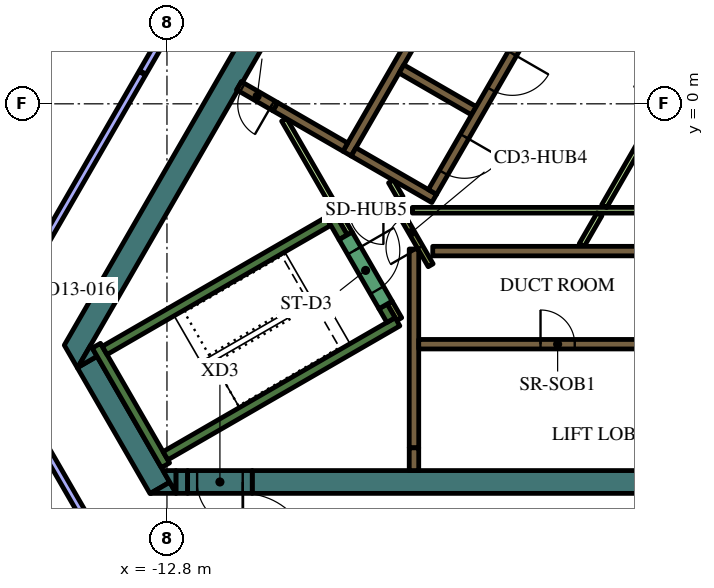
"""IFC4 building model, lengths in metres.
Left out: names, types, materials, properties, quantities, classifications, styles, units other than length and angle.
Written with IfcOpenShell. Run it as: python <this file> out.ifc"""

import sys

from ifc_helpers import new_model, si_unit, direction, frame, frame_2d, origin, place, context, subcontext, project, spatial, polyline, rectangle, outline, extrude, element, fill, save


model = new_model("IFC4")
c1 = context("Model", 3, precision=1e-05, world=origin(), true_north=direction((0.0, 1.0)))
c2 = subcontext(c1, "Body", "Model", "MODEL_VIEW")
j1 = project(units=[si_unit("LENGTHUNIT", "METRE"), si_unit("PLANEANGLEUNIT", "RADIAN")], contexts=[c1])
p1 = place(None, origin())
s1 = spatial("IfcSite", under=j1, at=p1, CompositionType="ELEMENT")
p2 = place(p1, origin())
s2 = spatial("IfcBuilding", under=s1, at=p2, CompositionType="ELEMENT")
p3 = place(p2, frame((0.0, 0.0, 292.2)))
s3 = spatial("IfcBuildingStorey", under=s2, at=p3, CompositionType="ELEMENT", Elevation=292.2)
p4 = place(p3, origin())
e1 = element("IfcWall", 1, at=p4, inside=s3, PredefinedType="SOLIDWALL", context=c2, shape_type="SweptSolid", body=[
    extrude(outline(polyline([(-15.502, -6.35), (-4.912, 11.992), (-4.393, 11.692), (-10.815, 0.569), (-10.84, 0.583), (-10.84, 0.583), (-10.84, 0.583), (-10.965, 0.367), (-10.965, 0.367), (-10.965, 0.367), (-10.94, 0.352), (-11.033, 0.191), (-14.809, -6.35), (-15.156, -6.95), (-15.502, -6.35)])), origin(), (0.0, 0.0, 1.0), 4.2),
])
p5 = place(p3, frame((-14.899, -6.795, 0.0), z_axis=(0.0, 0.0, 1.0), x_axis=(0.499950938802, -0.866053727428, 0.0)))
e2 = element("IfcWall", 2, at=p5, inside=s3, PredefinedType="SOLIDWALL", context=c2, shape_type="SweptSolid", body=[
    extrude(rectangle(XDim=3.823, YDim=0.6, at=frame_2d((1.912, 0.0))), origin(), (0.0, 0.0, 1.0), 4.2),
])
e3 = element("IfcWall", 3, at=p4, inside=s3, PredefinedType="SOLIDWALL", context=c2, shape_type="SweptSolid", body=[
    extrude(outline(polyline([(-14.64, -6.643), (-15.147, -6.936), (-14.809, -6.35), (-14.64, -6.643)])), origin(), (0.0, 0.0, 1.0), 4.2),
])
e4 = element("IfcWall", 4, at=p4, inside=s3, PredefinedType="SOLIDWALL", context=c2, shape_type="SweptSolid", body=[
    extrude(outline(polyline([(-12.557, -10.25), (-13.233, -10.25), (-12.726, -9.957), (-12.557, -10.25)])), origin(), (0.0, 0.0, 1.0), 4.2),
])
p6 = place(p3, frame((-12.257, -9.95, 0.0), z_axis=(0.0, 0.0, 1.0), x_axis=(-1.0, 0.0, 0.0)))
e5 = element("IfcWall", 5, at=p6, inside=s3, PredefinedType="SOLIDWALL", context=c2, shape_type="SweptSolid", body=[
    extrude(rectangle(XDim=0.307, YDim=0.6, at=frame_2d((0.154, 0.0))), origin(), (0.0, 0.0, 1.0), 4.2),
])
e6 = element("IfcWall", 6, at=p4, inside=s3, PredefinedType="SOLIDWALL", context=c2, shape_type="SweptSolid", body=[
    extrude(outline(polyline([(-12.904, -9.65), (-12.566, -9.65), (-12.566, -10.236), (-12.904, -9.65)])), origin(), (0.0, 0.0, 1.0), 4.2),
])
p7 = place(p3, frame((-10.556, -9.95, 0.0), z_axis=(0.0, 0.0, 1.0), x_axis=(1.0, 0.0, 0.0)))
e7 = element("IfcWall", 7, at=p7, inside=s3, PredefinedType="SOLIDWALL", context=c2, shape_type="SweptSolid", body=[
    extrude(rectangle(XDim=19.461, YDim=0.6, at=frame_2d((9.73, 0.0))), origin(), (0.0, 0.0, 1.0), 4.2),
])
p8 = place(p3, frame((-12.84, -9.511, 0.0), z_axis=(0.0, 0.0, 1.0), x_axis=(-0.499997733992, 0.866026712061, 0.0)))
e8 = element("IfcWall", 8, at=p8, inside=s3, PredefinedType="SOLIDWALL", context=c2, shape_type="SweptSolid", body=[
    extrude(rectangle(XDim=3.634, YDim=0.25, at=frame_2d((1.817, 0.0))), origin(), (0.0, 0.0, 1.0), 4.2),
])
p9 = place(p3, frame((-14.44, -6.49, 0.0), z_axis=(0.0, 0.0, 1.0), x_axis=(0.866022966069, 0.500004222222, 0.0)))
e9 = element("IfcWall", 9, at=p9, inside=s3, PredefinedType="SOLIDWALL", context=c2, shape_type="SweptSolid", body=[
    extrude(rectangle(XDim=6.8, YDim=0.25, at=frame_2d((3.4, 0.0))), origin(), (0.0, 0.0, 1.0), 4.2),
])
p10 = place(p3, frame((-8.163, -3.511, 0.0), z_axis=(0.0, 0.0, 1.0), x_axis=(-0.499994068514, 0.866028828302, 0.0)))
e10 = element("IfcWall", 10, at=p10, inside=s3, PredefinedType="SOLIDWALL", context=c2, shape_type="SweptSolid", body=[
    extrude(rectangle(XDim=0.674, YDim=0.25, at=frame_2d((0.337, 0.0))), origin(), (0.0, 0.0, 1.0), 4.2),
])
p11 = place(p3, frame((-12.84, -9.261, 0.0), z_axis=(0.0, 0.0, 1.0), x_axis=(0.866016039709, 0.500016218704, 0.0)))
e11 = element("IfcWall", 11, at=p11, inside=s3, PredefinedType="SOLIDWALL", context=c2, shape_type="SweptSolid", body=[
    extrude(rectangle(XDim=7.05, YDim=0.25, at=frame_2d((3.525, 0.0))), origin(), (0.0, 0.0, 1.0), 4.2),
])
p12 = place(p3, frame((-6.905, -5.69, 0.0), z_axis=(0.0, 0.0, 1.0), x_axis=(-0.499993700073, 0.866029041019, 0.0)))
e12 = element("IfcWall", 12, at=p12, inside=s3, PredefinedType="SOLIDWALL", context=c2, shape_type="SweptSolid", body=[
    extrude(rectangle(XDim=0.416, YDim=0.25, at=frame_2d((0.208, 0.0))), origin(), (0.0, 0.0, 1.0), 4.2),
])
p13 = place(p3, frame((-5.806, -3.875, 0.0), z_axis=(0.0, 0.0, 1.0), x_axis=(1.0, 0.0, 0.0)))
e13 = element("IfcWall", 13, at=p13, inside=s3, PredefinedType="SOLIDWALL", context=c2, shape_type="SweptSolid", body=[
    extrude(rectangle(XDim=12.231, YDim=0.25, at=frame_2d((6.116, 0.0))), origin(), (0.0, 0.0, 1.0), 4.2),
])
p14 = place(p3, frame((-6.3, -9.05, 0.0), z_axis=(0.0, 0.0, 1.0), x_axis=(0.0, 1.0, 0.0)))
e14 = element("IfcWall", 14, at=p14, inside=s3, PredefinedType="SOLIDWALL", context=c2, shape_type="SweptSolid", body=[
    extrude(rectangle(XDim=5.23, YDim=0.25, at=frame_2d((2.615, 0.0))), origin(), (0.0, 0.0, 1.0), 4.2),
])
p15 = place(p3, frame((-6.3, -9.052, 0.0), z_axis=(0.0, 0.0, 1.0), x_axis=(0.0, -1.0, 0.0)))
e15 = element("IfcWall", 15, at=p15, inside=s3, PredefinedType="SOLIDWALL", context=c2, shape_type="SweptSolid", body=[
    extrude(rectangle(XDim=0.598, YDim=0.25, at=frame_2d((0.299, 0.0))), origin(), (0.0, 0.0, 1.0), 4.2),
])
p16 = place(p3, frame((-8.06, -1.311, 0.0), z_axis=(0.0, 0.0, 1.0), x_axis=(0.50000273126, 0.866023826885, 0.0)))
e16 = element("IfcWall", 16, at=p16, inside=s3, PredefinedType="SOLIDWALL", context=c2, shape_type="SweptSolid", body=[
    extrude(rectangle(XDim=10.33, YDim=0.25, at=frame_2d((5.165, 0.0))), origin(), (0.0, 0.0, 1.0), 4.2),
])
p17 = place(p3, frame((-4.724, -0.182, 0.0), z_axis=(0.0, 0.0, 1.0), x_axis=(-0.866008176907, 0.50002983664, 0.0)))
e17 = element("IfcWall", 17, at=p17, inside=s3, PredefinedType="SOLIDWALL", context=c2, shape_type="SweptSolid", body=[
    extrude(rectangle(XDim=2.2, YDim=0.25, at=frame_2d((1.1, 0.0))), origin(), (0.0, 0.0, 1.0), 4.2),
])
p18 = place(p3, frame((-7.889, -1.265, 0.0), z_axis=(0.0, 0.0, 1.0), x_axis=(0.866057815567, -0.499943856944, 0.0)))
e18 = element("IfcWall", 18, at=p18, inside=s3, PredefinedType="SOLIDWALL", context=c2, shape_type="SweptSolid", body=[
    extrude(rectangle(XDim=2.45, YDim=0.25, at=frame_2d((1.225, 0.0))), origin(), (0.0, 0.0, 1.0), 4.2),
])
p19 = place(p3, frame((-9.95, -0.075, 0.0), z_axis=(0.0, 0.0, 1.0), x_axis=(0.865962177421, -0.500109495288, 0.0)))
e19 = element("IfcWall", 19, at=p19, inside=s3, PredefinedType="SOLIDWALL", context=c2, shape_type="SweptSolid", body=[
    extrude(rectangle(XDim=2.129, YDim=0.25, at=frame_2d((1.065, 0.0))), origin(), (0.0, 0.0, 1.0), 4.2),
])
p20 = place(p3, frame((-9.718, -0.417, 0.0), z_axis=(0.0, 0.0, 1.0), x_axis=(0.499966538646, -0.866044721844, 0.0)))
e20 = element("IfcWall", 20, at=p20, inside=s3, PredefinedType="PARTITIONING", context=c2, shape_type="SweptSolid", body=[
    extrude(rectangle(XDim=2.511, YDim=0.15, at=frame_2d((1.255, 0.0))), origin(), (0.0, 0.0, 1.0), 3.55),
])
p21 = place(p3, frame((1.438, -2.8, 0.0), z_axis=(0.0, 0.0, 1.0), x_axis=(-1.0, 0.0, 0.0)))
e21 = element("IfcWall", 21, at=p21, inside=s3, PredefinedType="PARTITIONING", context=c2, shape_type="SweptSolid", body=[
    extrude(rectangle(XDim=7.781, YDim=0.15, at=frame_2d((3.891, 0.0))), origin(), (0.0, 0.0, 1.0), 3.55),
])
p22 = place(p3, frame((-1.418, -2.907, 0.0), z_axis=(0.0, 0.0, 1.0), x_axis=(-0.499978056798, -0.866038072327, 0.0)))
e22 = element("IfcWall", 22, at=p22, inside=s3, PredefinedType="PARTITIONING", context=c2, shape_type="SweptSolid", body=[
    extrude(rectangle(XDim=0.937, YDim=0.15, at=frame_2d((0.469, 0.0))), origin(), (0.0, 0.0, 1.0), 3.55),
])
p23 = place(p3, frame((-1.295, -2.693, 0.0), z_axis=(0.0, 0.0, 1.0), x_axis=(0.500030943131, 0.866007538022, 0.0)))
e23 = element("IfcWall", 23, at=p23, inside=s3, PredefinedType="PARTITIONING", context=c2, shape_type="SweptSolid", body=[
    extrude(rectangle(XDim=2.672, YDim=0.15, at=frame_2d((1.336, 0.0))), origin(), (0.0, 0.0, 1.0), 3.55),
])
p24 = place(p3, frame((-6.653, -2.477, 0.0), z_axis=(0.0, 0.0, 1.0), x_axis=(-0.500002592159, 0.866023907196, 0.0)))
e24 = element("IfcWall", 24, at=p24, inside=s3, PredefinedType="PARTITIONING", context=c2, shape_type="SweptSolid", body=[
    extrude(rectangle(XDim=0.503, YDim=0.15, at=frame_2d((0.251, 0.0))), origin(), (0.0, 0.0, 1.0), 3.55),
])
p25 = place(p3, frame((-7.99, -3.412, 0.0), z_axis=(0.0, 0.0, 1.0), x_axis=(-0.499858525911, 0.866107068482, 0.0)))
e25 = element("IfcWall", 25, at=p25, inside=s3, PredefinedType="PARTITIONING", context=c2, shape_type="SweptSolid", body=[
    extrude(rectangle(XDim=0.466, YDim=0.15, at=frame_2d((0.233, 0.0))), origin(), (0.0, 0.0, 1.0), 3.55),
])
p26 = place(p3, frame((-6.94, -5.23, 0.0), z_axis=(0.0, 0.0, 1.0), x_axis=(0.499834152157, -0.86612113491, 0.0)))
e26 = element("IfcWall", 26, at=p26, inside=s3, PredefinedType="PARTITIONING", context=c2, shape_type="SweptSolid", body=[
    extrude(rectangle(XDim=0.505, YDim=0.15, at=frame_2d((0.252, 0.0))), origin(), (0.0, 0.0, 1.0), 4.2),
])
p27 = place(p3, frame((-6.175, -6.325, 0.0), z_axis=(0.0, 0.0, 1.0), x_axis=(1.0, 0.0, 0.0)))
e27 = element("IfcWall", 27, at=p27, inside=s3, PredefinedType="SOLIDWALL", context=c2, shape_type="SweptSolid", body=[
    extrude(rectangle(XDim=12.35, YDim=0.25, at=frame_2d((6.175, 0.0))), origin(), (0.0, 0.0, 1.0), 4.2),
])
p28 = place(p27, frame((3.205, 0.0, 0.0)))
e28 = element("IfcOpeningElement", 28, at=p28, cuts=e27, PredefinedType="OPENING", context=c2, shape_type="SweptSolid", body=[
    extrude(rectangle(XDim=0.9, YDim=2.1, at=frame_2d((0.45, 1.05))), frame((0.0, 0.135, 0.0), z_axis=(0.0, -1.0, 0.0), x_axis=(1.0, 0.0, 0.0)), (0.0, 0.0, 1.0), 0.27),
])
p29 = place(p27, frame((8.145, 0.0, 0.0)))
e29 = element("IfcOpeningElement", 29, at=p29, cuts=e27, PredefinedType="OPENING", context=c2, shape_type="SweptSolid", body=[
    extrude(rectangle(XDim=1.1, YDim=2.1, at=frame_2d((0.55, 1.05))), frame((0.0, 0.135, 0.0), z_axis=(0.0, -1.0, 0.0), x_axis=(1.0, 0.0, 0.0)), (0.0, 0.0, 1.0), 0.27),
])
p30 = place(p27, frame((10.665, 0.0, 0.0)))
e30 = element("IfcOpeningElement", 30, at=p30, cuts=e27, PredefinedType="OPENING", context=c2, shape_type="SweptSolid", body=[
    extrude(rectangle(XDim=1.1, YDim=2.1, at=frame_2d((0.55, 1.05))), frame((0.0, 0.135, 0.0), z_axis=(0.0, -1.0, 0.0), x_axis=(1.0, 0.0, 0.0)), (0.0, 0.0, 1.0), 0.27),
])
p31 = place(p3, frame((-0.898, 6.194, 0.0), z_axis=(0.0, 0.0, 1.0), x_axis=(-0.499996202215, -0.866027596426, 0.0)))
e31 = element("IfcWall", 31, at=p31, inside=s3, PredefinedType="SOLIDWALL", context=c2, shape_type="SweptSolid", body=[
    extrude(rectangle(XDim=9.83, YDim=0.25, at=frame_2d((4.915, 0.0))), origin(), (0.0, 0.0, 1.0), 4.2),
])
p32 = place(p31, frame((0.585, 0.0, 0.0)))
e32 = element("IfcOpeningElement", 32, at=p32, cuts=e31, PredefinedType="OPENING", context=c2, shape_type="SweptSolid", body=[
    extrude(rectangle(XDim=1.1, YDim=2.1, at=frame_2d((0.55, 1.05))), frame((0.0, 0.135, 0.0), z_axis=(0.0, -1.0, 0.0), x_axis=(1.0, 0.0, 0.0)), (0.0, 0.0, 1.0), 0.27),
])
p33 = place(p31, frame((3.105, 0.0, 0.0)))
e33 = element("IfcOpeningElement", 33, at=p33, cuts=e31, PredefinedType="OPENING", context=c2, shape_type="SweptSolid", body=[
    extrude(rectangle(XDim=1.1, YDim=2.1, at=frame_2d((0.55, 1.05))), frame((0.0, 0.135, 0.0), z_axis=(0.0, -1.0, 0.0), x_axis=(1.0, 0.0, 0.0)), (0.0, 0.0, 1.0), 0.27),
])
p34 = place(p31, frame((5.625, 0.0, 0.0)))
e34 = element("IfcOpeningElement", 34, at=p34, cuts=e31, PredefinedType="OPENING", context=c2, shape_type="SweptSolid", body=[
    extrude(rectangle(XDim=1.1, YDim=2.1, at=frame_2d((0.55, 1.05))), frame((0.0, 0.135, 0.0), z_axis=(0.0, -1.0, 0.0), x_axis=(1.0, 0.0, 0.0)), (0.0, 0.0, 1.0), 0.27),
])
p35 = place(p31, frame((8.145, 0.0, 0.0)))
e35 = element("IfcOpeningElement", 35, at=p35, cuts=e31, PredefinedType="OPENING", context=c2, shape_type="SweptSolid", body=[
    extrude(rectangle(XDim=1.1, YDim=2.1, at=frame_2d((0.55, 1.05))), frame((0.0, 0.135, 0.0), z_axis=(0.0, -1.0, 0.0), x_axis=(1.0, 0.0, 0.0)), (0.0, 0.0, 1.0), 0.27),
])
p36 = place(p3, frame((-8.098, -3.474, 0.0), z_axis=(0.0, 0.0, 1.0), x_axis=(0.49994051562, -0.866059744384, 0.0)))
e36 = element("IfcWall", 36, at=p36, inside=s3, PredefinedType="SOLIDWALL", context=c2, shape_type="SweptSolid", body=[
    extrude(rectangle(XDim=2.1, YDim=0.4, at=frame_2d((1.05, 0.0))), origin(), (0.0, 0.0, 1.0), 4.2),
])
p37 = place(p36, frame((0.45, 0.0, 0.0)))
e37 = element("IfcOpeningElement", 37, at=p37, cuts=e36, PredefinedType="OPENING", context=c2, shape_type="SweptSolid", body=[
    extrude(rectangle(XDim=1.2, YDim=2.1, at=frame_2d((0.6, 1.05))), frame((0.0, 0.21, 0.0), z_axis=(0.0, -1.0, 0.0), x_axis=(1.0, 0.0, 0.0)), (0.0, 0.0, 1.0), 0.42),
])
p38 = place(p3, frame((-5.861, -4.248, 0.0), z_axis=(0.0, 0.0, 1.0), x_axis=(-0.500043646338, 0.866000203093, 0.0)))
e38 = element("IfcWall", 38, at=p38, inside=s3, PredefinedType="PARTITIONING", context=c2, shape_type="SweptSolid", body=[
    extrude(rectangle(XDim=1.93, YDim=0.15, at=frame_2d((0.965, 0.0))), origin(), (0.0, 0.0, 1.0), 4.2),
])
p39 = place(p38, frame((0.55, 0.0, 0.0)))
e39 = element("IfcOpeningElement", 39, at=p39, cuts=e38, PredefinedType="OPENING", context=c2, shape_type="SweptSolid", body=[
    extrude(rectangle(XDim=0.9, YDim=2.1, at=frame_2d((0.45, 1.05))), frame((0.0, 0.085, 0.0), z_axis=(0.0, -1.0, 0.0), x_axis=(1.0, 0.0, 0.0)), (0.0, 0.0, 1.0), 0.17),
])
p40 = place(p3, frame((-10.556, -9.95, 0.0), z_axis=(0.0, 0.0, 1.0), x_axis=(-1.0, 0.0, 0.0)))
e40 = element("IfcWall", 40, at=p40, inside=s3, PredefinedType="SOLIDWALL", context=c2, shape_type="SweptSolid", body=[
    extrude(rectangle(XDim=1.7, YDim=0.6, at=frame_2d((0.85, 0.0))), origin(), (0.0, 0.0, 1.0), 4.2),
])
p41 = place(p40, frame((0.25, 0.0, 0.0)))
e41 = element("IfcOpeningElement", 41, at=p41, cuts=e40, PredefinedType="OPENING", context=c2, shape_type="SweptSolid", body=[
    extrude(rectangle(XDim=1.2, YDim=2.1, at=frame_2d((0.6, 1.05))), frame((0.0, 0.31, 0.0), z_axis=(0.0, -1.0, 0.0), x_axis=(1.0, 0.0, 0.0)), (0.0, 0.0, 1.0), 0.62),
])
p42 = place(p3, frame((-6.655, -2.8, 0.0), z_axis=(0.0, 0.0, 1.0), x_axis=(-1.0, 0.0, 0.0)))
e42 = element("IfcWall", 42, at=p42, inside=s3, PredefinedType="PARTITIONING", context=c2, shape_type="SweptSolid", body=[
    extrude(rectangle(XDim=1.8, YDim=0.15, at=frame_2d((0.9, 0.0))), origin(), (0.0, 0.0, 1.0), 3.55),
])
p43 = place(p42, frame((0.45, 0.0, 0.0)))
e43 = element("IfcOpeningElement", 43, at=p43, cuts=e42, PredefinedType="OPENING", context=c2, shape_type="SweptSolid", body=[
    extrude(rectangle(XDim=0.9, YDim=2.1, at=frame_2d((0.45, 1.05))), frame((0.0, 0.085, 0.0), z_axis=(0.0, -1.0, 0.0), x_axis=(1.0, 0.0, 0.0)), (0.0, 0.0, 1.0), 0.17),
])
p44 = place(p3, frame((-9.95, -0.075, 0.0), z_axis=(0.0, 0.0, 1.0), x_axis=(-0.865952669392, 0.500125958508, 0.0)))
e44 = element("IfcWall", 44, at=p44, inside=s3, PredefinedType="SOLIDWALL", context=c2, shape_type="SweptSolid", body=[
    extrude(rectangle(XDim=1.1, YDim=0.25, at=frame_2d((0.55, 0.0))), origin(), (0.0, 0.0, 1.0), 4.2),
])
p45 = place(p44, frame((0.1, 0.0, 0.0)))
e45 = element("IfcOpeningElement", 45, at=p45, cuts=e44, PredefinedType="OPENING", context=c2, shape_type="SweptSolid", body=[
    extrude(rectangle(XDim=0.9, YDim=2.1, at=frame_2d((0.45, 1.05))), frame((0.0, 0.135, 0.0), z_axis=(0.0, -1.0, 0.0), x_axis=(1.0, 0.0, 0.0)), (0.0, 0.0, 1.0), 0.27),
])
p46 = place(p3, frame((-17.497, -0.613, 0.0), z_axis=(0.0, 0.0, 1.0), x_axis=(0.447480081559, 0.89429389834, 0.0)))
e46 = element("IfcWall", 46, at=p46, inside=s3, PredefinedType="PARTITIONING", context=c2, shape_type="SweptSolid", body=[
    extrude(rectangle(XDim=5.863, YDim=0.15, at=frame_2d((2.931, 0.0))), origin(), (0.0, 0.0, 1.0), 3.55),
])
p47 = place(p46, frame((2.463, 0.0, 0.0)))
e47 = element("IfcOpeningElement", 47, at=p47, cuts=e46, PredefinedType="OPENING", context=c2, shape_type="SweptSolid", body=[
    extrude(rectangle(XDim=0.9, YDim=2.1, at=frame_2d((0.45, 1.05))), frame((0.0, 0.085, 0.0), z_axis=(0.0, -1.0, 0.0), x_axis=(1.0, 0.0, 0.0)), (0.0, 0.0, 1.0), 0.17),
])
p48 = place(p3, frame((-7.436, 11.221, 0.0), z_axis=(0.0, 0.0, 1.0), x_axis=(-0.49999894854, -0.866026010844, 0.0)))
e48 = element("IfcWall", 48, at=p48, inside=s3, PredefinedType="PARTITIONING", context=c2, shape_type="SweptSolid", body=[
    extrude(rectangle(XDim=12.0, YDim=0.2, at=frame_2d((6.0, 0.0))), origin(), (0.0, 0.0, 1.0), 3.55),
])
p49 = place(p48, frame((5.5, 0.0, 0.0)))
e49 = element("IfcOpeningElement", 49, at=p49, cuts=e48, PredefinedType="OPENING", context=c2, shape_type="SweptSolid", body=[
    extrude(rectangle(XDim=1.0, YDim=2.1, at=frame_2d((0.5, 1.05))), frame((0.0, 0.11, 0.0), z_axis=(0.0, -1.0, 0.0), x_axis=(1.0, 0.0, 0.0)), (0.0, 0.0, 1.0), 0.22),
])
p50 = place(p3, frame((-13.451, 0.803, 0.0), z_axis=(0.0, 0.0, 1.0), x_axis=(-0.499979102685, -0.866037468519, 0.0)))
e50 = element("IfcWall", 50, at=p50, inside=s3, PredefinedType="PARTITIONING", context=c2, shape_type="SweptSolid", body=[
    extrude(rectangle(XDim=7.795, YDim=0.2, at=frame_2d((3.897, 0.0))), origin(), (0.0, 0.0, 1.0), 3.55),
])
p51 = place(p3, frame((-17.565, -6.376, 0.0), z_axis=(0.0, 0.0, 1.0), x_axis=(0.499994477444, -0.86602859221, 0.0)))
e51 = element("IfcWall", 51, at=p51, inside=s3, PredefinedType="PARTITIONING", context=c2, shape_type="SweptSolid", body=[
    extrude(rectangle(XDim=6.552, YDim=0.2, at=frame_2d((3.276, 0.0))), origin(), (0.0, 0.0, 1.0), 3.55),
])
p52 = place(p28, origin())
e52 = element("IfcDoor", 52, at=p52, inside=s3, OperationType="SINGLE_SWING_LEFT", PredefinedType="DOOR", context=c2, shape_type="SweptSolid", body=[
    extrude(rectangle(XDim=0.9, YDim=2.1, at=frame_2d((0.45, 1.05))), frame((0.0, 0.025, 0.0), z_axis=(0.0, -1.0, 0.0), x_axis=(1.0, 0.0, 0.0)), (0.0, 0.0, 1.0), 0.05),
])
fill(e28, e52)
p53 = place(p34, origin())
e53 = element("IfcDoor", 53, at=p53, inside=s3, OperationType="DOUBLE_DOOR_SLIDING", PredefinedType="DOOR", context=c2, shape_type="SweptSolid", body=[
    extrude(rectangle(XDim=1.1, YDim=2.1, at=frame_2d((0.55, 1.05))), frame((0.0, 0.025, 0.0), z_axis=(0.0, -1.0, 0.0), x_axis=(1.0, 0.0, 0.0)), (0.0, 0.0, 1.0), 0.05),
])
fill(e34, e53)
p54 = place(p35, origin())
e54 = element("IfcDoor", 54, at=p54, inside=s3, OperationType="DOUBLE_DOOR_SLIDING", PredefinedType="DOOR", context=c2, shape_type="SweptSolid", body=[
    extrude(rectangle(XDim=1.1, YDim=2.1, at=frame_2d((0.55, 1.05))), frame((0.0, 0.025, 0.0), z_axis=(0.0, -1.0, 0.0), x_axis=(1.0, 0.0, 0.0)), (0.0, 0.0, 1.0), 0.05),
])
fill(e35, e54)
p55 = place(p37, origin())
e55 = element("IfcDoor", 55, at=p55, inside=s3, OperationType="SINGLE_SWING_LEFT", PredefinedType="DOOR", context=c2, shape_type="SweptSolid", body=[
    extrude(rectangle(XDim=1.2, YDim=2.1, at=frame_2d((0.6, 1.05))), frame((0.0, 0.025, 0.0), z_axis=(0.0, -1.0, 0.0), x_axis=(1.0, 0.0, 0.0)), (0.0, 0.0, 1.0), 0.05),
])
fill(e37, e55)
p56 = place(p39, origin())
e56 = element("IfcDoor", 56, at=p56, inside=s3, OperationType="SINGLE_SWING_LEFT", PredefinedType="DOOR", context=c2, shape_type="SweptSolid", body=[
    extrude(rectangle(XDim=0.9, YDim=2.1, at=frame_2d((0.45, 1.05))), frame((0.0, 0.025, 0.0), z_axis=(0.0, -1.0, 0.0), x_axis=(1.0, 0.0, 0.0)), (0.0, 0.0, 1.0), 0.05),
])
fill(e39, e56)
p57 = place(p41, origin())
e57 = element("IfcDoor", 57, at=p57, inside=s3, OperationType="SINGLE_SWING_LEFT", PredefinedType="DOOR", context=c2, shape_type="SweptSolid", body=[
    extrude(rectangle(XDim=1.2, YDim=2.1, at=frame_2d((0.6, 1.05))), frame((0.0, 0.025, 0.0), z_axis=(0.0, -1.0, 0.0), x_axis=(1.0, 0.0, 0.0)), (0.0, 0.0, 1.0), 0.05),
])
fill(e41, e57)
p58 = place(p43, origin())
e58 = element("IfcDoor", 58, at=p58, inside=s3, OperationType="SINGLE_SWING_LEFT", PredefinedType="DOOR", context=c2, shape_type="SweptSolid", body=[
    extrude(rectangle(XDim=0.9, YDim=2.1, at=frame_2d((0.45, 1.05))), frame((0.0, 0.025, 0.0), z_axis=(0.0, -1.0, 0.0), x_axis=(1.0, 0.0, 0.0)), (0.0, 0.0, 1.0), 0.05),
])
fill(e43, e58)
p59 = place(p45, origin())
e59 = element("IfcDoor", 59, at=p59, inside=s3, OperationType="SINGLE_SWING_LEFT", PredefinedType="DOOR", context=c2, shape_type="SweptSolid", body=[
    extrude(rectangle(XDim=0.9, YDim=2.1, at=frame_2d((0.45, 1.05))), frame((0.0, 0.025, 0.0), z_axis=(0.0, -1.0, 0.0), x_axis=(1.0, 0.0, 0.0)), (0.0, 0.0, 1.0), 0.05),
])
fill(e45, e59)
save(model, sys.argv[1])
